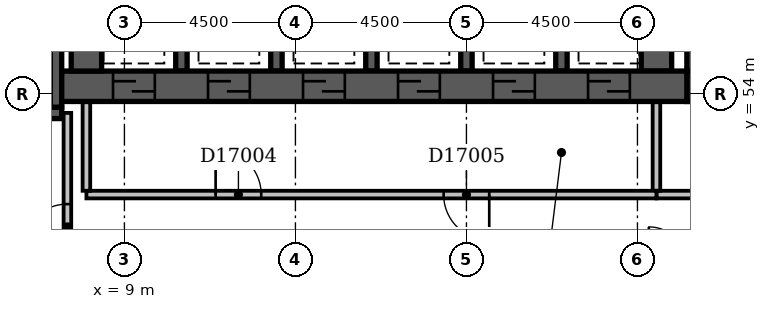
"""IFC4 building model, lengths in metres.
Left out: names, types, materials, properties, quantities, classifications, styles, units other than length and angle.
Written with IfcOpenShell. Run it as: python <this file> out.ifc"""

import sys

from ifc_helpers import new_model, si_unit, direction, frame, frame_2d, origin, place, context, subcontext, project, spatial, rectangle, extrude, element, fill, save


model = new_model("IFC4")
c1 = context("Model", 3, precision=1e-05, world=origin(), true_north=direction((0.0, 1.0)))
c2 = subcontext(c1, "Body", "Model", "MODEL_VIEW")
j1 = project(units=[si_unit("LENGTHUNIT", "METRE"), si_unit("PLANEANGLEUNIT", "RADIAN")], contexts=[c1])
p1 = place(None, origin())
s1 = spatial("IfcSite", under=j1, at=p1, CompositionType="ELEMENT")
p2 = place(p1, origin())
s2 = spatial("IfcBuilding", under=s1, at=p2, CompositionType="ELEMENT")
p3 = place(p2, frame((0.0, 0.0, 72.2)))
s3 = spatial("IfcBuildingStorey", under=s2, at=p3, CompositionType="ELEMENT", Elevation=72.2)
p4 = place(p3, frame((0.35, 53.5, -0.3), z_axis=(0.0, 0.0, 1.0), x_axis=(1.0, 0.0, 0.0)))
e1 = element("IfcWall", 1, at=p4, inside=s3, PredefinedType="SHEAR", context=c2, shape_type="SweptSolid", body=[
    extrude(rectangle(XDim=7.0, YDim=0.3, at=frame_2d((3.5, 0.0))), origin(), (0.0, 0.0, 1.0), 3.6),
])
p5 = place(p4, frame((5.58, 0.0, 0.3)))
e2 = element("IfcOpeningElement", 2, at=p5, cuts=e1, PredefinedType="OPENING", context=c2, shape_type="SweptSolid", body=[
    extrude(rectangle(XDim=1.1, YDim=2.1, at=frame_2d((0.55, 1.05))), frame((0.0, 0.162, 0.0), z_axis=(0.0, -1.0, 0.0), x_axis=(1.0, 0.0, 0.0)), (0.0, 0.0, 1.0), 0.324),
])
p6 = place(p3, frame((7.2, 53.65, -0.3), z_axis=(0.0, 0.0, 1.0), x_axis=(0.0, 1.0, 0.0)))
e3 = element("IfcWall", 3, at=p6, inside=s3, PredefinedType="SHEAR", context=c2, shape_type="SweptSolid", body=[
    extrude(rectangle(XDim=4.2, YDim=0.3, at=frame_2d((2.1, 0.0))), origin(), (0.0, 0.0, 1.0), 3.6),
])
p7 = place(p3, frame((7.35, 54.2, -0.3), z_axis=(0.0, 0.0, 1.0), x_axis=(1.0, 0.0, 0.0)))
e4 = element("IfcWall", 4, at=p7, inside=s3, PredefinedType="SHEAR", context=c2, shape_type="SweptSolid", body=[
    extrude(rectangle(XDim=16.45, YDim=0.8, at=frame_2d((8.225, 0.0))), origin(), (0.0, 0.0, 1.0), 3.6),
])
p8 = place(p7, frame((1.35, 0.0, 0.3)))
e5 = element("IfcOpeningElement", 5, at=p8, cuts=e4, PredefinedType="OPENING", context=c2, shape_type="SweptSolid", body=[
    extrude(rectangle(XDim=1.1, YDim=2.1, at=frame_2d((0.55, 1.05))), frame((0.0, 0.412, 0.0), z_axis=(0.0, -1.0, 0.0), x_axis=(1.0, 0.0, 0.0)), (0.0, 0.0, 1.0), 0.824),
])
p9 = place(p7, frame((3.85, 0.0, 0.3)))
e6 = element("IfcOpeningElement", 6, at=p9, cuts=e4, PredefinedType="OPENING", context=c2, shape_type="SweptSolid", body=[
    extrude(rectangle(XDim=1.1, YDim=2.1, at=frame_2d((0.55, 1.05))), frame((0.0, 0.412, 0.0), z_axis=(0.0, -1.0, 0.0), x_axis=(1.0, 0.0, 0.0)), (0.0, 0.0, 1.0), 0.824),
])
p10 = place(p7, frame((6.35, 0.0, 0.3)))
e7 = element("IfcOpeningElement", 7, at=p10, cuts=e4, PredefinedType="OPENING", context=c2, shape_type="SweptSolid", body=[
    extrude(rectangle(XDim=1.1, YDim=2.1, at=frame_2d((0.55, 1.05))), frame((0.0, 0.412, 0.0), z_axis=(0.0, -1.0, 0.0), x_axis=(1.0, 0.0, 0.0)), (0.0, 0.0, 1.0), 0.824),
])
p11 = place(p7, frame((8.85, 0.0, 0.3)))
e8 = element("IfcOpeningElement", 8, at=p11, cuts=e4, PredefinedType="OPENING", context=c2, shape_type="SweptSolid", body=[
    extrude(rectangle(XDim=1.1, YDim=2.1, at=frame_2d((0.55, 1.05))), frame((0.0, 0.412, 0.0), z_axis=(0.0, -1.0, 0.0), x_axis=(1.0, 0.0, 0.0)), (0.0, 0.0, 1.0), 0.824),
])
p12 = place(p7, frame((11.35, 0.0, 0.3)))
e9 = element("IfcOpeningElement", 9, at=p12, cuts=e4, PredefinedType="OPENING", context=c2, shape_type="SweptSolid", body=[
    extrude(rectangle(XDim=1.1, YDim=2.1, at=frame_2d((0.55, 1.05))), frame((0.0, 0.412, 0.0), z_axis=(0.0, -1.0, 0.0), x_axis=(1.0, 0.0, 0.0)), (0.0, 0.0, 1.0), 0.824),
])
p13 = place(p7, frame((13.85, 0.0, 0.3)))
e10 = element("IfcOpeningElement", 10, at=p13, cuts=e4, PredefinedType="OPENING", context=c2, shape_type="SweptSolid", body=[
    extrude(rectangle(XDim=1.1, YDim=2.1, at=frame_2d((0.55, 1.05))), frame((0.0, 0.412, 0.0), z_axis=(0.0, -1.0, 0.0), x_axis=(1.0, 0.0, 0.0)), (0.0, 0.0, 1.0), 0.824),
])
p14 = place(p3, frame((8.0, 54.6, -0.3), z_axis=(0.0, 0.0, 1.0), x_axis=(0.0, 1.0, 0.0)))
e11 = element("IfcWall", 11, at=p14, inside=s3, PredefinedType="SHEAR", context=c2, shape_type="SweptSolid", body=[
    extrude(rectangle(XDim=3.0, YDim=0.8, at=frame_2d((1.5, 0.0))), origin(), (0.0, 0.0, 1.0), 3.6),
])
for number, where, z_axis, x_axis in (
    (12, (10.5, 54.6, -0.3), (0.0, 0.0, 1.0), (0.0, 1.0, 0.0)),
    (13, (13.0, 54.6, -0.3), (0.0, 0.0, 1.0), (0.0, 1.0, 0.0)),
    (14, (15.5, 54.6, -0.3), (0.0, 0.0, 1.0), (0.0, 1.0, 0.0)),
    (15, (18.0, 54.6, -0.3), (0.0, 0.0, 1.0), (0.0, 1.0, 0.0)),
    (16, (20.5, 54.6, -0.3), (0.0, 0.0, 1.0), (0.0, 1.0, 0.0)),
):
    element("IfcWall", number, at=place(p3, frame(where, z_axis=z_axis, x_axis=x_axis)), inside=s3, PredefinedType="SHEAR", context=c2, shape_type="SweptSolid", body=[
        extrude(rectangle(XDim=3.0, YDim=0.3, at=frame_2d((1.5, 0.0))), origin(), (0.0, 0.0, 1.0), 3.6),
    ])
p15 = place(p3, frame((23.0, 54.6, -0.3), z_axis=(0.0, 0.0, 1.0), x_axis=(0.0, 1.0, 0.0)))
e17 = element("IfcWall", 17, at=p15, inside=s3, PredefinedType="SHEAR", context=c2, shape_type="SweptSolid", body=[
    extrude(rectangle(XDim=3.0, YDim=0.8, at=frame_2d((1.5, 0.0))), origin(), (0.0, 0.0, 1.0), 3.6),
])
p16 = place(p3, frame((23.8, 54.2, -0.3), z_axis=(0.0, 0.0, 1.0), x_axis=(1.0, 0.0, 0.0)))
e18 = element("IfcWall", 18, at=p16, inside=s3, PredefinedType="SHEAR", context=c2, shape_type="SweptSolid", body=[
    extrude(rectangle(XDim=3.3, YDim=0.8, at=frame_2d((1.65, 0.0))), origin(), (0.0, 0.0, 1.0), 3.6),
])
p17 = place(p16, frame((1.1, 0.0, 0.3)))
e19 = element("IfcOpeningElement", 19, at=p17, cuts=e18, PredefinedType="OPENING", context=c2, shape_type="SweptSolid", body=[
    extrude(rectangle(XDim=1.1, YDim=2.1, at=frame_2d((0.55, 1.05))), frame((0.0, 0.412, 0.0), z_axis=(0.0, -1.0, 0.0), x_axis=(1.0, 0.0, 0.0)), (0.0, 0.0, 1.0), 0.824),
])
p18 = place(p3, frame((24.2, 54.6, -0.3), z_axis=(0.0, 0.0, 1.0), x_axis=(0.0, 1.0, 0.0)))
e20 = element("IfcWall", 20, at=p18, inside=s3, PredefinedType="SHEAR", context=c2, shape_type="SweptSolid", body=[
    extrude(rectangle(XDim=3.0, YDim=0.8, at=frame_2d((1.5, 0.0))), origin(), (0.0, 0.0, 1.0), 3.6),
])
p19 = place(p3, frame((8.0, 51.35, 0.0), z_axis=(0.0, 0.0, 1.0), x_axis=(1.0, 0.0, 0.0)))
e21 = element("IfcWall", 21, at=p19, inside=s3, PredefinedType="PARTITIONING", context=c2, shape_type="SweptSolid", body=[
    extrude(rectangle(XDim=15.0, YDim=0.2, at=frame_2d((7.5, 0.0))), origin(), (0.0, 0.0, 1.0), 3.3),
])
p20 = place(p19, frame((3.4, 0.0, 0.0)))
e22 = element("IfcOpeningElement", 22, at=p20, cuts=e21, PredefinedType="OPENING", context=c2, shape_type="SweptSolid", body=[
    extrude(rectangle(XDim=1.2, YDim=2.1, at=frame_2d((0.6, 1.05))), frame((0.0, 0.112, 0.0), z_axis=(0.0, -1.0, 0.0), x_axis=(1.0, 0.0, 0.0)), (0.0, 0.0, 1.0), 0.224),
])
p21 = place(p19, frame((9.4, 0.0, 0.0)))
e23 = element("IfcOpeningElement", 23, at=p21, cuts=e21, PredefinedType="OPENING", context=c2, shape_type="SweptSolid", body=[
    extrude(rectangle(XDim=1.2, YDim=2.1, at=frame_2d((0.6, 1.05))), frame((0.0, 0.112, 0.0), z_axis=(0.0, -1.0, 0.0), x_axis=(1.0, 0.0, 0.0)), (0.0, 0.0, 1.0), 0.224),
])
for number, where, z_axis, x_axis in (
    (24, (23.0, 51.45, 0.0), (0.0, 0.0, 1.0), (0.0, 1.0, 0.0)),
    (25, (8.0, 51.45, 0.0), (0.0, 0.0, 1.0), (0.0, 1.0, 0.0)),
):
    element("IfcWall", number, at=place(p3, frame(where, z_axis=z_axis, x_axis=x_axis)), inside=s3, PredefinedType="PARTITIONING", context=c2, shape_type="SweptSolid", body=[
        extrude(rectangle(XDim=2.33, YDim=0.2, at=frame_2d((1.165, 0.0))), origin(), (0.0, 0.0, 1.0), 3.3),
    ])
p22 = place(p3, frame((23.0, 51.35, 0.0), z_axis=(0.0, 0.0, 1.0), x_axis=(1.0, 0.0, 0.0)))
e26 = element("IfcWall", 26, at=p22, inside=s3, PredefinedType="PARTITIONING", context=c2, shape_type="SweptSolid", body=[
    extrude(rectangle(XDim=4.8, YDim=0.2, at=frame_2d((2.4, 0.0))), origin(), (0.0, 0.0, 1.0), 3.3),
])
p23 = place(p22, frame((1.65, 0.0, 0.0)))
e27 = element("IfcOpeningElement", 27, at=p23, cuts=e26, PredefinedType="OPENING", context=c2, shape_type="SweptSolid", body=[
    extrude(rectangle(XDim=1.2, YDim=2.1, at=frame_2d((0.6, 1.05))), frame((0.0, 0.112, 0.0), z_axis=(0.0, -1.0, 0.0), x_axis=(1.0, 0.0, 0.0)), (0.0, 0.0, 1.0), 0.224),
])
p24 = place(p3, frame((7.5, 49.6, 0.0), z_axis=(0.0, 0.0, 1.0), x_axis=(0.0, 1.0, 0.0)))
e28 = element("IfcWall", 28, at=p24, inside=s3, PredefinedType="PARTITIONING", context=c2, shape_type="SweptSolid", body=[
    extrude(rectangle(XDim=3.9, YDim=0.2, at=frame_2d((1.95, 0.0))), origin(), (0.0, 0.0, 1.0), 3.3),
])
p25 = place(p24, frame((0.3, 0.0, 0.0)))
e29 = element("IfcOpeningElement", 29, at=p25, cuts=e28, PredefinedType="OPENING", context=c2, shape_type="SweptSolid", body=[
    extrude(rectangle(XDim=1.2, YDim=2.1, at=frame_2d((0.6, 1.05))), frame((0.0, 0.112, 0.0), z_axis=(0.0, -1.0, 0.0), x_axis=(1.0, 0.0, 0.0)), (0.0, 0.0, 1.0), 0.224),
])
p26 = place(p25, origin())
e30 = element("IfcDoor", 30, at=p26, inside=s3, OperationType="SINGLE_SWING_LEFT", PredefinedType="DOOR", context=c2, shape_type="SweptSolid", body=[
    extrude(rectangle(XDim=1.2, YDim=2.1, at=frame_2d((0.6, 1.05))), frame((0.0, 0.025, 0.0), z_axis=(0.0, -1.0, 0.0), x_axis=(1.0, 0.0, 0.0)), (0.0, 0.0, 1.0), 0.05),
])
fill(e29, e30)
p27 = place(p8, origin())
e31 = element("IfcDoor", 31, at=p27, inside=s3, OperationType="SLIDING_TO_LEFT", PredefinedType="DOOR", context=c2, shape_type="SweptSolid", body=[
    extrude(rectangle(XDim=1.1, YDim=2.1, at=frame_2d((0.55, 1.05))), frame((0.0, 0.025, 0.0), z_axis=(0.0, -1.0, 0.0), x_axis=(1.0, 0.0, 0.0)), (0.0, 0.0, 1.0), 0.05),
])
fill(e5, e31)
p28 = place(p9, origin())
e32 = element("IfcDoor", 32, at=p28, inside=s3, OperationType="SLIDING_TO_LEFT", PredefinedType="DOOR", context=c2, shape_type="SweptSolid", body=[
    extrude(rectangle(XDim=1.1, YDim=2.1, at=frame_2d((0.55, 1.05))), frame((0.0, 0.025, 0.0), z_axis=(0.0, -1.0, 0.0), x_axis=(1.0, 0.0, 0.0)), (0.0, 0.0, 1.0), 0.05),
])
fill(e6, e32)
p29 = place(p10, origin())
e33 = element("IfcDoor", 33, at=p29, inside=s3, OperationType="SLIDING_TO_LEFT", PredefinedType="DOOR", context=c2, shape_type="SweptSolid", body=[
    extrude(rectangle(XDim=1.1, YDim=2.1, at=frame_2d((0.55, 1.05))), frame((0.0, 0.025, 0.0), z_axis=(0.0, -1.0, 0.0), x_axis=(1.0, 0.0, 0.0)), (0.0, 0.0, 1.0), 0.05),
])
fill(e7, e33)
p30 = place(p11, origin())
e34 = element("IfcDoor", 34, at=p30, inside=s3, OperationType="SLIDING_TO_LEFT", PredefinedType="DOOR", context=c2, shape_type="SweptSolid", body=[
    extrude(rectangle(XDim=1.1, YDim=2.1, at=frame_2d((0.55, 1.05))), frame((0.0, 0.025, 0.0), z_axis=(0.0, -1.0, 0.0), x_axis=(1.0, 0.0, 0.0)), (0.0, 0.0, 1.0), 0.05),
])
fill(e8, e34)
p31 = place(p12, origin())
e35 = element("IfcDoor", 35, at=p31, inside=s3, OperationType="SLIDING_TO_LEFT", PredefinedType="DOOR", context=c2, shape_type="SweptSolid", body=[
    extrude(rectangle(XDim=1.1, YDim=2.1, at=frame_2d((0.55, 1.05))), frame((0.0, 0.025, 0.0), z_axis=(0.0, -1.0, 0.0), x_axis=(1.0, 0.0, 0.0)), (0.0, 0.0, 1.0), 0.05),
])
fill(e9, e35)
p32 = place(p13, origin())
e36 = element("IfcDoor", 36, at=p32, inside=s3, OperationType="SLIDING_TO_LEFT", PredefinedType="DOOR", context=c2, shape_type="SweptSolid", body=[
    extrude(rectangle(XDim=1.1, YDim=2.1, at=frame_2d((0.55, 1.05))), frame((0.0, 0.025, 0.0), z_axis=(0.0, -1.0, 0.0), x_axis=(1.0, 0.0, 0.0)), (0.0, 0.0, 1.0), 0.05),
])
fill(e10, e36)
p33 = place(p20, origin())
e37 = element("IfcDoor", 37, at=p33, inside=s3, OperationType="SINGLE_SWING_LEFT", PredefinedType="DOOR", context=c2, shape_type="SweptSolid", body=[
    extrude(rectangle(XDim=1.2, YDim=2.1, at=frame_2d((0.6, 1.05))), frame((0.0, 0.025, 0.0), z_axis=(0.0, -1.0, 0.0), x_axis=(1.0, 0.0, 0.0)), (0.0, 0.0, 1.0), 0.05),
])
fill(e22, e37)
p34 = place(p21, origin())
e38 = element("IfcDoor", 38, at=p34, inside=s3, OperationType="SINGLE_SWING_RIGHT", PredefinedType="DOOR", context=c2, shape_type="SweptSolid", body=[
    extrude(rectangle(XDim=1.2, YDim=2.1, at=frame_2d((0.6, 1.05))), frame((0.0, 0.025, 0.0), z_axis=(0.0, -1.0, 0.0), x_axis=(1.0, 0.0, 0.0)), (0.0, 0.0, 1.0), 0.05),
])
fill(e23, e38)
save(model, sys.argv[1])
